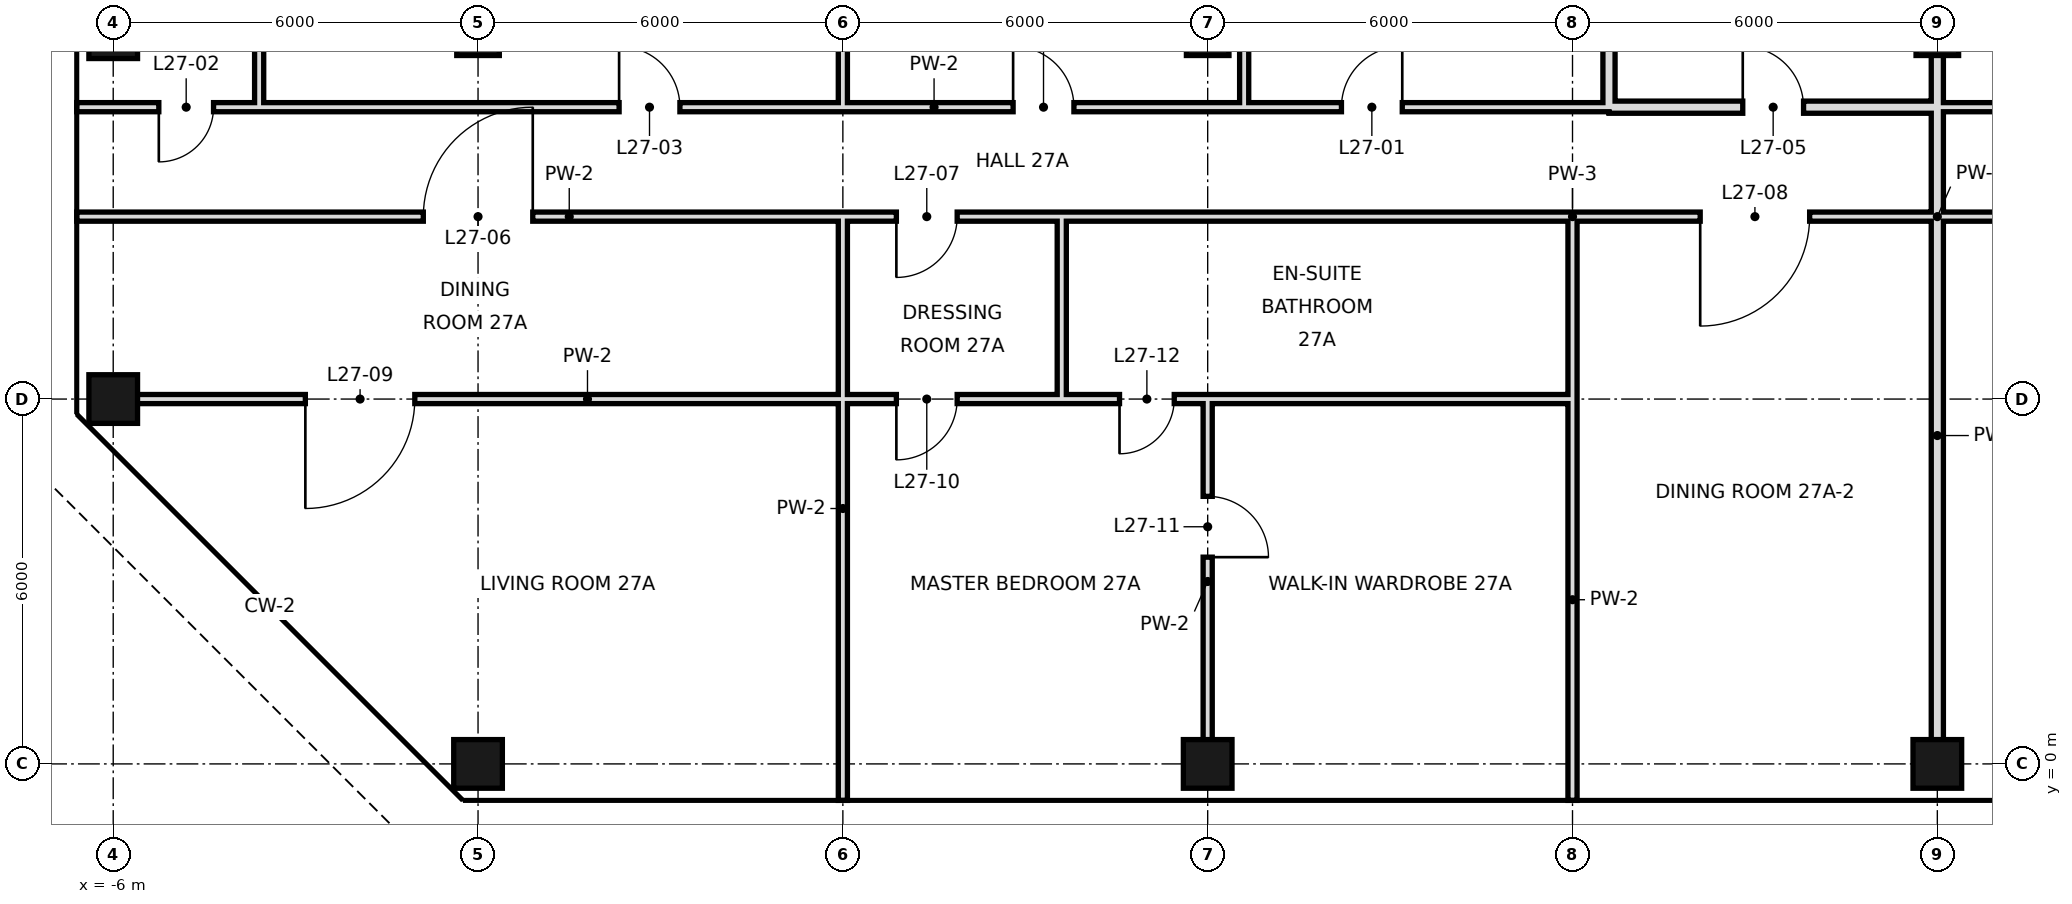
"""IFC4 building model, lengths in metres.
Left out: names, types, materials, properties, quantities, classifications, styles, units other than length and angle.
Written with IfcOpenShell. Run it as: python <this file> out.ifc"""

import sys

from ifc_helpers import new_model, si_unit, direction, frame, frame_2d, origin, origin_2d, place, context, subcontext, project, spatial, rectangle, hollow_rectangle, extrude, element, fill, save


model = new_model("IFC4")
c1 = context("Model", 3, precision=1e-05, world=origin(), true_north=direction((0.0, 1.0)))
c2 = subcontext(c1, "Body", "Model", "MODEL_VIEW")
j1 = project(units=[si_unit("LENGTHUNIT", "METRE"), si_unit("PLANEANGLEUNIT", "RADIAN")], contexts=[c1])
p1 = place(None, origin())
s1 = spatial("IfcSite", under=j1, at=p1, CompositionType="ELEMENT")
p2 = place(p1, origin())
s2 = spatial("IfcBuilding", under=s1, at=p2, CompositionType="ELEMENT")
p3 = place(p2, frame((0.0, 0.0, 123.2)))
s3 = spatial("IfcBuildingStorey", under=s2, at=p3, CompositionType="ELEMENT", Elevation=123.2)
for number, where, z_axis, x_axis in (
    (1, (-6.0, 6.0, 0.0), (0.0, 0.0, 1.0), (1.0, 0.0, 0.0)),
    (2, (-6.0, 12.0, 0.0), (0.0, 0.0, 1.0), (1.0, 0.0, 0.0)),
    (3, (0.0, 0.0, 0.0), (0.0, 0.0, 1.0), (1.0, 0.0, 0.0)),
):
    element("IfcColumn", number, at=place(p3, frame(where, z_axis=z_axis, x_axis=x_axis)), inside=s3, PredefinedType="COLUMN", context=c2, shape_type="SweptSolid", body=[
        extrude(hollow_rectangle(XDim=0.8, YDim=0.8, WallThickness=0.04, at=origin_2d()), origin(), (0.0, 0.0, 1.0), 3.6),
    ])
p4 = place(p3, frame((0.0, 12.0, 0.0), z_axis=(0.0, 0.0, 1.0), x_axis=(1.0, 0.0, 0.0)))
e4 = element("IfcColumn", 4, at=p4, inside=s3, PredefinedType="COLUMN", context=c2, shape_type="SweptSolid", body=[
    extrude(hollow_rectangle(XDim=0.7, YDim=0.7, WallThickness=0.036, at=origin_2d()), origin(), (0.0, 0.0, 1.0), 3.6),
])
p5 = place(p3, frame((12.0, 0.0, 0.0), z_axis=(0.0, 0.0, 1.0), x_axis=(1.0, 0.0, 0.0)))
e5 = element("IfcColumn", 5, at=p5, inside=s3, PredefinedType="COLUMN", context=c2, shape_type="SweptSolid", body=[
    extrude(hollow_rectangle(XDim=0.8, YDim=0.8, WallThickness=0.04, at=origin_2d()), origin(), (0.0, 0.0, 1.0), 3.6),
])
p6 = place(p3, frame((12.0, 12.0, 0.0), z_axis=(0.0, 0.0, 1.0), x_axis=(1.0, 0.0, 0.0)))
e6 = element("IfcColumn", 6, at=p6, inside=s3, PredefinedType="COLUMN", context=c2, shape_type="SweptSolid", body=[
    extrude(hollow_rectangle(XDim=0.7, YDim=0.7, WallThickness=0.036, at=origin_2d()), origin(), (0.0, 0.0, 1.0), 3.6),
])
p7 = place(p3, frame((24.0, 0.0, 0.0), z_axis=(0.0, 0.0, 1.0), x_axis=(1.0, 0.0, 0.0)))
e7 = element("IfcColumn", 7, at=p7, inside=s3, PredefinedType="COLUMN", context=c2, shape_type="SweptSolid", body=[
    extrude(hollow_rectangle(XDim=0.8, YDim=0.8, WallThickness=0.04, at=origin_2d()), origin(), (0.0, 0.0, 1.0), 3.6),
])
p8 = place(p3, frame((24.0, 12.0, 0.0), z_axis=(0.0, 0.0, 1.0), x_axis=(1.0, 0.0, 0.0)))
e8 = element("IfcColumn", 8, at=p8, inside=s3, PredefinedType="COLUMN", context=c2, shape_type="SweptSolid", body=[
    extrude(hollow_rectangle(XDim=0.7, YDim=0.7, WallThickness=0.036, at=origin_2d()), origin(), (0.0, 0.0, 1.0), 3.6),
])
p9 = place(p3, frame((-3.6, 10.8, 0.0), z_axis=(0.0, 0.0, 1.0), x_axis=(0.0, 1.0, 0.0)))
e9 = element("IfcWall", 9, at=p9, inside=s3, PredefinedType="PARTITIONING", context=c2, shape_type="SweptSolid", body=[
    extrude(rectangle(XDim=7.2, YDim=0.15, at=frame_2d((3.6, 0.0))), origin(), (0.0, 0.0, 1.0), 3.42),
])
p10 = place(p3, frame((12.0, 0.0, 0.0), z_axis=(0.0, 0.0, 1.0), x_axis=(0.0, 1.0, 0.0)))
e10 = element("IfcWall", 10, at=p10, inside=s3, PredefinedType="PARTITIONING", context=c2, shape_type="SweptSolid", body=[
    extrude(rectangle(XDim=6.0, YDim=0.15, at=frame_2d((3.0, 0.0))), origin(), (0.0, 0.0, 1.0), 2.72),
])
p11 = place(p10, frame((3.4, 0.0, 0.0)))
e11 = element("IfcOpeningElement", 11, at=p11, cuts=e10, PredefinedType="OPENING", context=c2, shape_type="SweptSolid", body=[
    extrude(rectangle(XDim=1.0, YDim=2.4, at=frame_2d((0.5, 1.2))), frame((0.0, 0.085, 0.0), z_axis=(0.0, -1.0, 0.0), x_axis=(1.0, 0.0, 0.0)), (0.0, 0.0, 1.0), 0.17),
])
p12 = place(p3, frame((12.6, 10.8, 0.0), z_axis=(0.0, 0.0, 1.0), x_axis=(0.0, 1.0, 0.0)))
e12 = element("IfcWall", 12, at=p12, inside=s3, PredefinedType="PARTITIONING", context=c2, shape_type="SweptSolid", body=[
    extrude(rectangle(XDim=7.9, YDim=0.15, at=frame_2d((3.95, 0.0))), origin(), (0.0, 0.0, 1.0), 3.42),
])
p13 = place(p3, frame((18.0, -0.6, 0.0), z_axis=(0.0, 0.0, 1.0), x_axis=(0.0, 1.0, 0.0)))
e13 = element("IfcWall", 13, at=p13, inside=s3, PredefinedType="PARTITIONING", context=c2, shape_type="SweptSolid", body=[
    extrude(rectangle(XDim=6.6, YDim=0.15, at=frame_2d((3.3, 0.0))), origin(), (0.0, 0.0, 1.0), 2.72),
])
p14 = place(p3, frame((18.0, 6.0, 0.0), z_axis=(0.0, 0.0, 1.0), x_axis=(0.0, 1.0, 0.0)))
e14 = element("IfcWall", 14, at=p14, inside=s3, PredefinedType="PARTITIONING", context=c2, shape_type="SweptSolid", body=[
    extrude(rectangle(XDim=3.0, YDim=0.15, at=frame_2d((1.5, 0.0))), origin(), (0.0, 0.0, 1.0), 2.72),
])
for number, where, z_axis, x_axis in (
    (15, (18.6, 10.8, 0.0), (0.0, 0.0, 1.0), (0.0, 1.0, 0.0)),
    (16, (24.0, 10.8, 0.0), (0.0, 0.0, 1.0), (0.0, 1.0, 0.0)),
):
    element("IfcWall", number, at=place(p3, frame(where, z_axis=z_axis, x_axis=x_axis)), inside=s3, PredefinedType="SOLIDWALL", context=c2, shape_type="SweptSolid", body=[
        extrude(rectangle(XDim=7.9, YDim=0.2, at=frame_2d((3.95, 0.0))), origin(), (0.0, 0.0, 1.0), 2.72),
    ])
p15 = place(p3, frame((24.0, 0.0, 0.0), z_axis=(0.0, 0.0, 1.0), x_axis=(0.0, 1.0, 0.0)))
e17 = element("IfcWall", 17, at=p15, inside=s3, PredefinedType="SOLIDWALL", context=c2, shape_type="SweptSolid", body=[
    extrude(rectangle(XDim=10.8, YDim=0.2, at=frame_2d((5.4, 0.0))), origin(), (0.0, 0.0, 1.0), 2.72),
])
p16 = place(p3, frame((6.0, -0.6, 0.0), z_axis=(0.0, 0.0, 1.0), x_axis=(0.0, 1.0, 0.0)))
e18 = element("IfcWall", 18, at=p16, inside=s3, PredefinedType="PARTITIONING", context=c2, shape_type="SweptSolid", body=[
    extrude(rectangle(XDim=9.6, YDim=0.15, at=frame_2d((4.8, 0.0))), origin(), (0.0, 0.0, 1.0), 2.72),
])
p17 = place(p3, frame((6.0, 10.8, 0.0), z_axis=(0.0, 0.0, 1.0), x_axis=(0.0, 1.0, 0.0)))
e19 = element("IfcWall", 19, at=p17, inside=s3, PredefinedType="PARTITIONING", context=c2, shape_type="SweptSolid", body=[
    extrude(rectangle(XDim=7.9, YDim=0.15, at=frame_2d((3.95, 0.0))), origin(), (0.0, 0.0, 1.0), 2.72),
])
p18 = place(p3, frame((9.6, 6.0, 0.0), z_axis=(0.0, 0.0, 1.0), x_axis=(0.0, 1.0, 0.0)))
e20 = element("IfcWall", 20, at=p18, inside=s3, PredefinedType="PARTITIONING", context=c2, shape_type="SweptSolid", body=[
    extrude(rectangle(XDim=3.0, YDim=0.15, at=frame_2d((1.5, 0.0))), origin(), (0.0, 0.0, 1.0), 3.42),
])
p19 = place(p3, frame((18.6, 10.8, 0.0), z_axis=(0.0, 0.0, 1.0), x_axis=(1.0, 0.0, 0.0)))
e21 = element("IfcWall", 21, at=p19, inside=s3, PredefinedType="SOLIDWALL", context=c2, shape_type="SweptSolid", body=[
    extrude(rectangle(XDim=5.4, YDim=0.2, at=frame_2d((2.7, 0.0))), origin(), (0.0, 0.0, 1.0), 2.72),
])
p20 = place(p19, frame((2.2, 0.0, 0.0)))
e22 = element("IfcOpeningElement", 22, at=p20, cuts=e21, PredefinedType="OPENING", context=c2, shape_type="SweptSolid", body=[
    extrude(rectangle(XDim=1.0, YDim=2.4, at=frame_2d((0.5, 1.2))), frame((0.0, 0.11, 0.0), z_axis=(0.0, -1.0, 0.0), x_axis=(1.0, 0.0, 0.0)), (0.0, 0.0, 1.0), 0.22),
])
p21 = place(p3, frame((-3.6, 10.8, 0.0), z_axis=(0.0, 0.0, 1.0), x_axis=(1.0, 0.0, 0.0)))
e23 = element("IfcWall", 23, at=p21, inside=s3, PredefinedType="PARTITIONING", context=c2, shape_type="SweptSolid", body=[
    extrude(rectangle(XDim=22.2, YDim=0.15, at=frame_2d((11.1, 0.0))), origin(), (0.0, 0.0, 1.0), 3.42),
])
p22 = place(p21, frame((17.8, 0.0, 0.0)))
e24 = element("IfcOpeningElement", 24, at=p22, cuts=e23, PredefinedType="OPENING", context=c2, shape_type="SweptSolid", body=[
    extrude(rectangle(XDim=1.0, YDim=2.4, at=frame_2d((0.5, 1.2))), frame((0.0, 0.085, 0.0), z_axis=(0.0, -1.0, 0.0), x_axis=(1.0, 0.0, 0.0)), (0.0, 0.0, 1.0), 0.17),
])
p23 = place(p21, frame((5.92, 0.0, 0.0)))
e25 = element("IfcOpeningElement", 25, at=p23, cuts=e23, PredefinedType="OPENING", context=c2, shape_type="SweptSolid", body=[
    extrude(rectangle(XDim=1.0, YDim=2.4, at=frame_2d((0.5, 1.2))), frame((0.0, 0.085, 0.0), z_axis=(0.0, -1.0, 0.0), x_axis=(1.0, 0.0, 0.0)), (0.0, 0.0, 1.0), 0.17),
])
p24 = place(p21, frame((12.4, 0.0, 0.0)))
e26 = element("IfcOpeningElement", 26, at=p24, cuts=e23, PredefinedType="OPENING", context=c2, shape_type="SweptSolid", body=[
    extrude(rectangle(XDim=1.0, YDim=2.4, at=frame_2d((0.5, 1.2))), frame((0.0, 0.085, 0.0), z_axis=(0.0, -1.0, 0.0), x_axis=(1.0, 0.0, 0.0)), (0.0, 0.0, 1.0), 0.17),
])
p25 = place(p3, frame((24.0, 10.8, 0.0), z_axis=(0.0, 0.0, 1.0), x_axis=(1.0, 0.0, 0.0)))
e27 = element("IfcWall", 27, at=p25, inside=s3, PredefinedType="PARTITIONING", context=c2, shape_type="SweptSolid", body=[
    extrude(rectangle(XDim=6.0, YDim=0.15, at=frame_2d((3.0, 0.0))), origin(), (0.0, 0.0, 1.0), 3.42),
])
p26 = place(p25, frame((3.4, 0.0, 0.0)))
e28 = element("IfcOpeningElement", 28, at=p26, cuts=e27, PredefinedType="OPENING", context=c2, shape_type="SweptSolid", body=[
    extrude(rectangle(XDim=1.0, YDim=2.4, at=frame_2d((0.5, 1.2))), frame((0.0, 0.085, 0.0), z_axis=(0.0, -1.0, 0.0), x_axis=(1.0, 0.0, 0.0)), (0.0, 0.0, 1.0), 0.17),
])
p27 = place(p3, frame((-6.6, 10.8, 0.0), z_axis=(0.0, 0.0, 1.0), x_axis=(1.0, 0.0, 0.0)))
e29 = element("IfcWall", 29, at=p27, inside=s3, PredefinedType="PARTITIONING", context=c2, shape_type="SweptSolid", body=[
    extrude(rectangle(XDim=3.0, YDim=0.15, at=frame_2d((1.5, 0.0))), origin(), (0.0, 0.0, 1.0), 3.42),
])
p28 = place(p27, frame((1.35, 0.0, 0.0)))
e30 = element("IfcOpeningElement", 30, at=p28, cuts=e29, PredefinedType="OPENING", context=c2, shape_type="SweptSolid", body=[
    extrude(rectangle(XDim=0.9, YDim=2.4, at=frame_2d((0.45, 1.2))), frame((0.0, 0.085, 0.0), z_axis=(0.0, -1.0, 0.0), x_axis=(1.0, 0.0, 0.0)), (0.0, 0.0, 1.0), 0.17),
])
p29 = place(p3, frame((-6.0, 6.0, 0.0), z_axis=(0.0, 0.0, 1.0), x_axis=(1.0, 0.0, 0.0)))
e31 = element("IfcWall", 31, at=p29, inside=s3, PredefinedType="PARTITIONING", context=c2, shape_type="SweptSolid", body=[
    extrude(rectangle(XDim=15.6, YDim=0.15, at=frame_2d((7.8, 0.0))), origin(), (0.0, 0.0, 1.0), 2.97),
])
p30 = place(p29, frame((3.16, 0.0, 0.0)))
e32 = element("IfcOpeningElement", 32, at=p30, cuts=e31, PredefinedType="OPENING", context=c2, shape_type="SweptSolid", body=[
    extrude(rectangle(XDim=1.8, YDim=2.4, at=frame_2d((0.9, 1.2))), frame((0.0, 0.085, 0.0), z_axis=(0.0, -1.0, 0.0), x_axis=(1.0, 0.0, 0.0)), (0.0, 0.0, 1.0), 0.17),
])
p31 = place(p29, frame((12.88, 0.0, 0.0)))
e33 = element("IfcOpeningElement", 33, at=p31, cuts=e31, PredefinedType="OPENING", context=c2, shape_type="SweptSolid", body=[
    extrude(rectangle(XDim=1.0, YDim=2.4, at=frame_2d((0.5, 1.2))), frame((0.0, 0.085, 0.0), z_axis=(0.0, -1.0, 0.0), x_axis=(1.0, 0.0, 0.0)), (0.0, 0.0, 1.0), 0.17),
])
p32 = place(p3, frame((9.6, 6.0, 0.0), z_axis=(0.0, 0.0, 1.0), x_axis=(1.0, 0.0, 0.0)))
e34 = element("IfcWall", 34, at=p32, inside=s3, PredefinedType="PARTITIONING", context=c2, shape_type="SweptSolid", body=[
    extrude(rectangle(XDim=8.4, YDim=0.15, at=frame_2d((4.2, 0.0))), origin(), (0.0, 0.0, 1.0), 2.97),
])
p33 = place(p32, frame((0.95, 0.0, 0.0)))
e35 = element("IfcOpeningElement", 35, at=p33, cuts=e34, PredefinedType="OPENING", context=c2, shape_type="SweptSolid", body=[
    extrude(rectangle(XDim=0.9, YDim=2.4, at=frame_2d((0.45, 1.2))), frame((0.0, 0.085, 0.0), z_axis=(0.0, -1.0, 0.0), x_axis=(1.0, 0.0, 0.0)), (0.0, 0.0, 1.0), 0.17),
])
p34 = place(p3, frame((-6.6, 9.0, 0.0), z_axis=(0.0, 0.0, 1.0), x_axis=(1.0, 0.0, 0.0)))
e36 = element("IfcWall", 36, at=p34, inside=s3, PredefinedType="PARTITIONING", context=c2, shape_type="SweptSolid", body=[
    extrude(rectangle(XDim=16.2, YDim=0.15, at=frame_2d((8.1, 0.0))), origin(), (0.0, 0.0, 1.0), 3.42),
])
p35 = place(p34, frame((5.7, 0.0, 0.0)))
e37 = element("IfcOpeningElement", 37, at=p35, cuts=e36, PredefinedType="OPENING", context=c2, shape_type="SweptSolid", body=[
    extrude(rectangle(XDim=1.8, YDim=2.4, at=frame_2d((0.9, 1.2))), frame((0.0, 0.085, 0.0), z_axis=(0.0, -1.0, 0.0), x_axis=(1.0, 0.0, 0.0)), (0.0, 0.0, 1.0), 0.17),
])
p36 = place(p34, frame((13.48, 0.0, 0.0)))
e38 = element("IfcOpeningElement", 38, at=p36, cuts=e36, PredefinedType="OPENING", context=c2, shape_type="SweptSolid", body=[
    extrude(rectangle(XDim=1.0, YDim=2.4, at=frame_2d((0.5, 1.2))), frame((0.0, 0.085, 0.0), z_axis=(0.0, -1.0, 0.0), x_axis=(1.0, 0.0, 0.0)), (0.0, 0.0, 1.0), 0.17),
])
p37 = place(p3, frame((18.0, 9.0, 0.0), z_axis=(0.0, 0.0, 1.0), x_axis=(1.0, 0.0, 0.0)))
e39 = element("IfcWall", 39, at=p37, inside=s3, PredefinedType="PARTITIONING", context=c2, shape_type="SweptSolid", body=[
    extrude(rectangle(XDim=12.0, YDim=0.15, at=frame_2d((6.0, 0.0))), origin(), (0.0, 0.0, 1.0), 3.42),
])
p38 = place(p37, frame((2.1, 0.0, 0.0)))
e40 = element("IfcOpeningElement", 40, at=p38, cuts=e39, PredefinedType="OPENING", context=c2, shape_type="SweptSolid", body=[
    extrude(rectangle(XDim=1.8, YDim=2.4, at=frame_2d((0.9, 1.2))), frame((0.0, 0.085, 0.0), z_axis=(0.0, -1.0, 0.0), x_axis=(1.0, 0.0, 0.0)), (0.0, 0.0, 1.0), 0.17),
])
p39 = place(p37, frame((7.6, 0.0, 0.0)))
e41 = element("IfcOpeningElement", 41, at=p39, cuts=e39, PredefinedType="OPENING", context=c2, shape_type="SweptSolid", body=[
    extrude(rectangle(XDim=1.0, YDim=2.4, at=frame_2d((0.5, 1.2))), frame((0.0, 0.085, 0.0), z_axis=(0.0, -1.0, 0.0), x_axis=(1.0, 0.0, 0.0)), (0.0, 0.0, 1.0), 0.17),
])
p40 = place(p3, frame((9.6, 9.0, 0.0), z_axis=(0.0, 0.0, 1.0), x_axis=(1.0, 0.0, 0.0)))
e42 = element("IfcWall", 42, at=p40, inside=s3, PredefinedType="PARTITIONING", context=c2, shape_type="SweptSolid", body=[
    extrude(rectangle(XDim=8.4, YDim=0.15, at=frame_2d((4.2, 0.0))), origin(), (0.0, 0.0, 1.0), 3.42),
])
p41 = place(p22, frame((1.0, 0.0, 0.0), z_axis=(0.0, 0.0, 1.0), x_axis=(-1.0, 0.0, 0.0)))
e43 = element("IfcDoor", 43, at=p41, inside=s3, OperationType="SINGLE_SWING_LEFT", PredefinedType="DOOR", context=c2, shape_type="SweptSolid", body=[
    extrude(rectangle(XDim=1.0, YDim=2.4, at=frame_2d((0.5, 1.2))), frame((0.0, 0.025, 0.0), z_axis=(0.0, -1.0, 0.0), x_axis=(1.0, 0.0, 0.0)), (0.0, 0.0, 1.0), 0.05),
])
fill(e24, e43)
p42 = place(p28, frame((0.9, 0.0, 0.0), z_axis=(0.0, 0.0, 1.0), x_axis=(-1.0, 0.0, 0.0)))
e44 = element("IfcDoor", 44, at=p42, inside=s3, OperationType="SINGLE_SWING_RIGHT", PredefinedType="DOOR", context=c2, shape_type="SweptSolid", body=[
    extrude(rectangle(XDim=0.9, YDim=2.4, at=frame_2d((0.45, 1.2))), frame((0.0, 0.025, 0.0), z_axis=(0.0, -1.0, 0.0), x_axis=(1.0, 0.0, 0.0)), (0.0, 0.0, 1.0), 0.05),
])
fill(e30, e44)
p43 = place(p23, origin())
e45 = element("IfcDoor", 45, at=p43, inside=s3, OperationType="SINGLE_SWING_LEFT", PredefinedType="DOOR", context=c2, shape_type="SweptSolid", body=[
    extrude(rectangle(XDim=1.0, YDim=2.4, at=frame_2d((0.5, 1.2))), frame((0.0, 0.025, 0.0), z_axis=(0.0, -1.0, 0.0), x_axis=(1.0, 0.0, 0.0)), (0.0, 0.0, 1.0), 0.05),
])
fill(e25, e45)
p44 = place(p24, origin())
e46 = element("IfcDoor", 46, at=p44, inside=s3, OperationType="SINGLE_SWING_LEFT", PredefinedType="DOOR", context=c2, shape_type="SweptSolid", body=[
    extrude(rectangle(XDim=1.0, YDim=2.4, at=frame_2d((0.5, 1.2))), frame((0.0, 0.025, 0.0), z_axis=(0.0, -1.0, 0.0), x_axis=(1.0, 0.0, 0.0)), (0.0, 0.0, 1.0), 0.05),
])
fill(e26, e46)
p45 = place(p20, origin())
e47 = element("IfcDoor", 47, at=p45, inside=s3, OperationType="SINGLE_SWING_LEFT", PredefinedType="DOOR", context=c2, shape_type="SweptSolid", body=[
    extrude(rectangle(XDim=1.0, YDim=2.4, at=frame_2d((0.5, 1.2))), frame((0.0, 0.025, 0.0), z_axis=(0.0, -1.0, 0.0), x_axis=(1.0, 0.0, 0.0)), (0.0, 0.0, 1.0), 0.05),
])
fill(e22, e47)
p46 = place(p35, frame((1.8, 0.0, 0.0), z_axis=(0.0, 0.0, 1.0), x_axis=(-1.0, 0.0, 0.0)))
e48 = element("IfcDoor", 48, at=p46, inside=s3, OperationType="SINGLE_SWING_LEFT", PredefinedType="DOOR", context=c2, shape_type="SweptSolid", body=[
    extrude(rectangle(XDim=1.8, YDim=2.4, at=frame_2d((0.9, 1.2))), frame((0.0, 0.025, 0.0), z_axis=(0.0, -1.0, 0.0), x_axis=(1.0, 0.0, 0.0)), (0.0, 0.0, 1.0), 0.05),
])
fill(e37, e48)
p47 = place(p36, frame((1.0, 0.0, 0.0), z_axis=(0.0, 0.0, 1.0), x_axis=(-1.0, 0.0, 0.0)))
e49 = element("IfcDoor", 49, at=p47, inside=s3, OperationType="SINGLE_SWING_RIGHT", PredefinedType="DOOR", context=c2, shape_type="SweptSolid", body=[
    extrude(rectangle(XDim=1.0, YDim=2.4, at=frame_2d((0.5, 1.2))), frame((0.0, 0.025, 0.0), z_axis=(0.0, -1.0, 0.0), x_axis=(1.0, 0.0, 0.0)), (0.0, 0.0, 1.0), 0.05),
])
fill(e38, e49)
p48 = place(p38, frame((1.8, 0.0, 0.0), z_axis=(0.0, 0.0, 1.0), x_axis=(-1.0, 0.0, 0.0)))
e50 = element("IfcDoor", 50, at=p48, inside=s3, OperationType="SINGLE_SWING_RIGHT", PredefinedType="DOOR", context=c2, shape_type="SweptSolid", body=[
    extrude(rectangle(XDim=1.8, YDim=2.4, at=frame_2d((0.9, 1.2))), frame((0.0, 0.025, 0.0), z_axis=(0.0, -1.0, 0.0), x_axis=(1.0, 0.0, 0.0)), (0.0, 0.0, 1.0), 0.05),
])
fill(e40, e50)
p49 = place(p30, frame((1.8, 0.0, 0.0), z_axis=(0.0, 0.0, 1.0), x_axis=(-1.0, 0.0, 0.0)))
e51 = element("IfcDoor", 51, at=p49, inside=s3, OperationType="SINGLE_SWING_RIGHT", PredefinedType="DOOR", context=c2, shape_type="SweptSolid", body=[
    extrude(rectangle(XDim=1.8, YDim=2.4, at=frame_2d((0.9, 1.2))), frame((0.0, 0.025, 0.0), z_axis=(0.0, -1.0, 0.0), x_axis=(1.0, 0.0, 0.0)), (0.0, 0.0, 1.0), 0.05),
])
fill(e32, e51)
p50 = place(p31, frame((1.0, 0.0, 0.0), z_axis=(0.0, 0.0, 1.0), x_axis=(-1.0, 0.0, 0.0)))
e52 = element("IfcDoor", 52, at=p50, inside=s3, OperationType="SINGLE_SWING_RIGHT", PredefinedType="DOOR", context=c2, shape_type="SweptSolid", body=[
    extrude(rectangle(XDim=1.0, YDim=2.4, at=frame_2d((0.5, 1.2))), frame((0.0, 0.025, 0.0), z_axis=(0.0, -1.0, 0.0), x_axis=(1.0, 0.0, 0.0)), (0.0, 0.0, 1.0), 0.05),
])
fill(e33, e52)
p51 = place(p11, frame((1.0, 0.0, 0.0), z_axis=(0.0, 0.0, 1.0), x_axis=(-1.0, 0.0, 0.0)))
e53 = element("IfcDoor", 53, at=p51, inside=s3, OperationType="SINGLE_SWING_RIGHT", PredefinedType="DOOR", context=c2, shape_type="SweptSolid", body=[
    extrude(rectangle(XDim=1.0, YDim=2.4, at=frame_2d((0.5, 1.2))), frame((0.0, 0.025, 0.0), z_axis=(0.0, -1.0, 0.0), x_axis=(1.0, 0.0, 0.0)), (0.0, 0.0, 1.0), 0.05),
])
fill(e11, e53)
p52 = place(p33, frame((0.9, 0.0, 0.0), z_axis=(0.0, 0.0, 1.0), x_axis=(-1.0, 0.0, 0.0)))
e54 = element("IfcDoor", 54, at=p52, inside=s3, OperationType="SINGLE_SWING_RIGHT", PredefinedType="DOOR", context=c2, shape_type="SweptSolid", body=[
    extrude(rectangle(XDim=0.9, YDim=2.4, at=frame_2d((0.45, 1.2))), frame((0.0, 0.025, 0.0), z_axis=(0.0, -1.0, 0.0), x_axis=(1.0, 0.0, 0.0)), (0.0, 0.0, 1.0), 0.05),
])
fill(e35, e54)
save(model, sys.argv[1])
